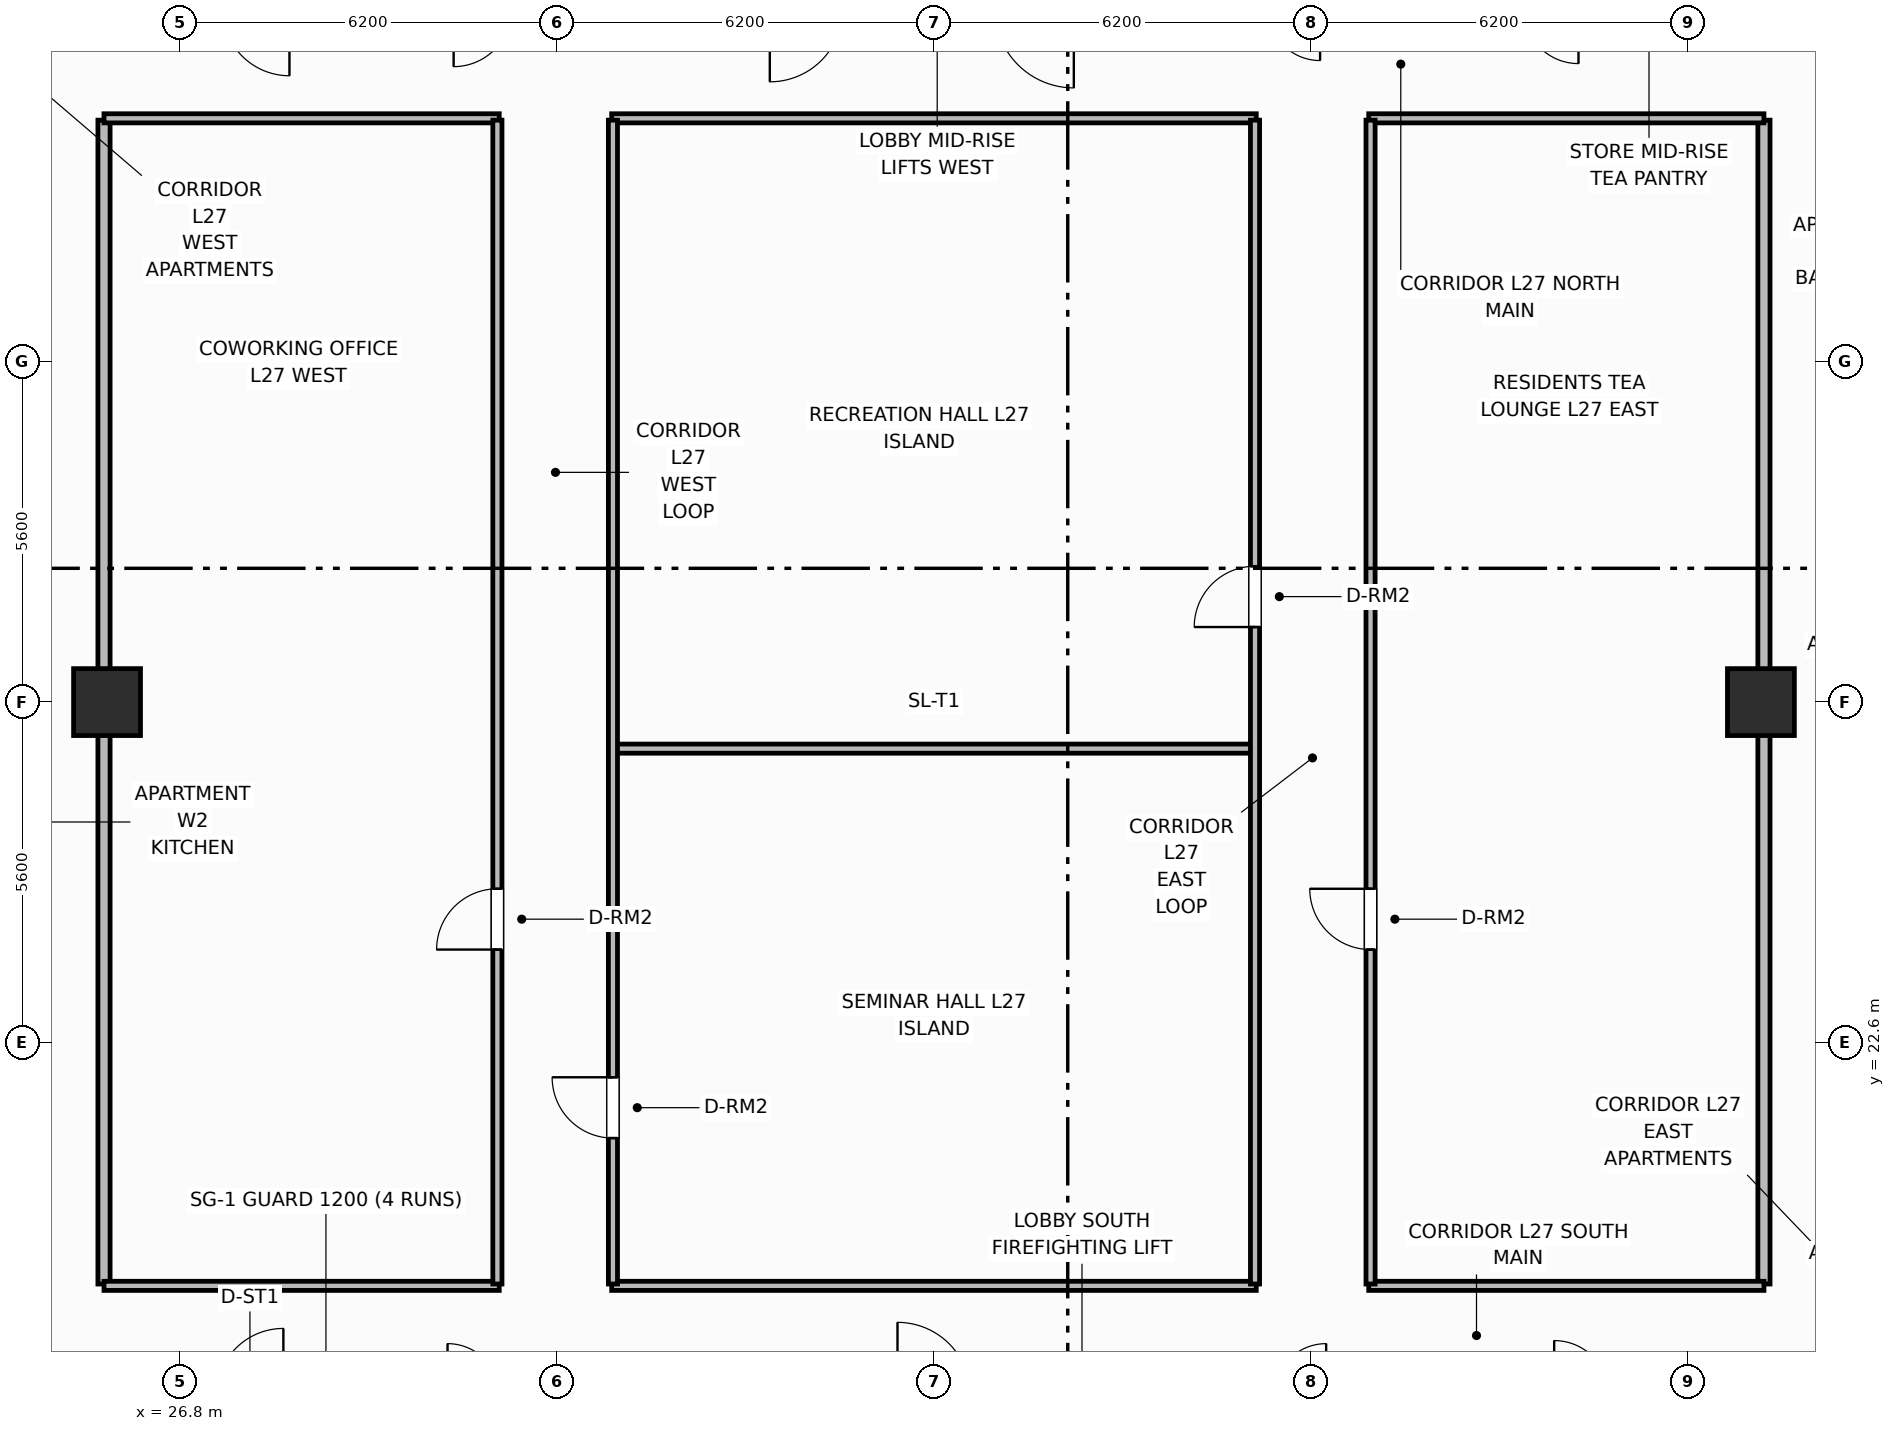
"""IFC4 building model, lengths in metres.
Left out: names, types, materials, properties, quantities, classifications, styles, units other than length and angle.
Written with IfcOpenShell. Run it as: python <this file> out.ifc"""

import sys

from ifc_helpers import new_model, si_unit, direction, frame, frame_2d, origin, origin_2d, place, context, subcontext, project, spatial, rectangle, extrude, element, fill, save


model = new_model("IFC4")
c1 = context("Model", 3, precision=1e-05, world=origin(), true_north=direction((0.0, 1.0)))
c2 = subcontext(c1, "Body", "Model", "MODEL_VIEW")
j1 = project(units=[si_unit("LENGTHUNIT", "METRE"), si_unit("PLANEANGLEUNIT", "RADIAN")], contexts=[c1])
p1 = place(None, origin())
s1 = spatial("IfcSite", under=j1, at=p1, CompositionType="ELEMENT")
p2 = place(p1, origin())
s2 = spatial("IfcBuilding", under=s1, at=p2, CompositionType="ELEMENT")
p3 = place(p2, frame((0.0, 0.0, 110.5)))
s3 = spatial("IfcBuildingStorey", under=s2, at=p3, CompositionType="ELEMENT", Elevation=110.5)
for number, where, z_axis, x_axis in (
    (1, (25.6, 28.2, 0.0), (0.0, 0.0, 1.0), (1.0, 0.0, 0.0)),
    (2, (52.8, 28.2, 0.0), (0.0, 0.0, 1.0), (1.0, 0.0, 0.0)),
):
    element("IfcColumn", number, at=place(p3, frame(where, z_axis=z_axis, x_axis=x_axis)), inside=s3, PredefinedType="COLUMN", context=c2, shape_type="SweptSolid", body=[
        extrude(rectangle(XDim=1.1, YDim=1.1, at=origin_2d()), origin(), (0.0, 0.0, 1.0), 3.7),
    ])
for number, where, z_axis, x_axis in (
    (3, (25.55, 18.63, 0.0), (0.0, 0.0, 1.0), (0.0, 1.0, 0.0)),
    (4, (52.85, 18.63, 0.0), (0.0, 0.0, 1.0), (0.0, 1.0, 0.0)),
):
    element("IfcWall", number, at=place(p3, frame(where, z_axis=z_axis, x_axis=x_axis)), inside=s3, PredefinedType="PARTITIONING", context=c2, shape_type="SweptSolid", body=[
        extrude(rectangle(XDim=19.14, YDim=0.2, at=frame_2d((9.57, 0.0))), origin(), (0.0, 0.0, 1.0), 2.53),
    ])
for number, where, z_axis, x_axis in (
    (5, (25.55, 18.6, 0.0), (0.0, 0.0, 1.0), (1.0, 0.0, 0.0)),
    (6, (25.55, 37.8, 0.0), (0.0, 0.0, 1.0), (1.0, 0.0, 0.0)),
):
    element("IfcWall", number, at=place(p3, frame(where, z_axis=z_axis, x_axis=x_axis)), inside=s3, PredefinedType="PARTITIONING", context=c2, shape_type="SweptSolid", body=[
        extrude(rectangle(XDim=6.5, YDim=0.15, at=frame_2d((3.25, 0.0))), origin(), (0.0, 0.0, 1.0), 2.53),
    ])
for number, where, z_axis, x_axis in (
    (7, (33.9, 18.6, 0.0), (0.0, 0.0, 1.0), (1.0, 0.0, 0.0)),
    (8, (33.9, 37.8, 0.0), (0.0, 0.0, 1.0), (1.0, 0.0, 0.0)),
):
    element("IfcWall", number, at=place(p3, frame(where, z_axis=z_axis, x_axis=x_axis)), inside=s3, PredefinedType="PARTITIONING", context=c2, shape_type="SweptSolid", body=[
        extrude(rectangle(XDim=10.6, YDim=0.15, at=frame_2d((5.3, 0.0))), origin(), (0.0, 0.0, 1.0), 2.53),
    ])
for number, where, z_axis, x_axis in (
    (9, (46.35, 18.6, 0.0), (0.0, 0.0, 1.0), (1.0, 0.0, 0.0)),
    (10, (46.35, 37.8, 0.0), (0.0, 0.0, 1.0), (1.0, 0.0, 0.0)),
):
    element("IfcWall", number, at=place(p3, frame(where, z_axis=z_axis, x_axis=x_axis)), inside=s3, PredefinedType="PARTITIONING", context=c2, shape_type="SweptSolid", body=[
        extrude(rectangle(XDim=6.5, YDim=0.15, at=frame_2d((3.25, 0.0))), origin(), (0.0, 0.0, 1.0), 2.53),
    ])
p4 = place(p3, frame((33.92, 27.434, 0.0), z_axis=(0.0, 0.0, 1.0), x_axis=(1.0, 0.0, 0.0)))
e11 = element("IfcWall", 11, at=p4, inside=s3, PredefinedType="PARTITIONING", context=c2, shape_type="SweptSolid", body=[
    extrude(rectangle(XDim=10.56, YDim=0.15, at=frame_2d((5.28, 0.0))), origin(), (0.0, 0.0, 1.0), 2.53),
])
p5 = place(p3, frame((32.02, 18.63, 0.0), z_axis=(0.0, 0.0, 1.0), x_axis=(0.0, 1.0, 0.0)))
e12 = element("IfcWall", 12, at=p5, inside=s3, PredefinedType="PARTITIONING", context=c2, shape_type="SweptSolid", body=[
    extrude(rectangle(XDim=19.14, YDim=0.15, at=frame_2d((9.57, 0.0))), origin(), (0.0, 0.0, 1.0), 2.53),
])
p6 = place(p5, frame((5.5, 0.0, 0.0)))
e13 = element("IfcOpeningElement", 13, at=p6, cuts=e12, PredefinedType="OPENING", context=c2, shape_type="SweptSolid", body=[
    extrude(rectangle(XDim=1.0, YDim=2.15, at=frame_2d((0.5, 1.075))), frame((0.0, 0.085, 0.0), z_axis=(0.0, -1.0, 0.0), x_axis=(1.0, 0.0, 0.0)), (0.0, 0.0, 1.0), 0.17),
])
p7 = place(p3, frame((33.92, 18.63, 0.0), z_axis=(0.0, 0.0, 1.0), x_axis=(0.0, 1.0, 0.0)))
e14 = element("IfcWall", 14, at=p7, inside=s3, PredefinedType="PARTITIONING", context=c2, shape_type="SweptSolid", body=[
    extrude(rectangle(XDim=19.14, YDim=0.15, at=frame_2d((9.57, 0.0))), origin(), (0.0, 0.0, 1.0), 2.53),
])
p8 = place(p7, frame((2.4, 0.0, 0.0)))
e15 = element("IfcOpeningElement", 15, at=p8, cuts=e14, PredefinedType="OPENING", context=c2, shape_type="SweptSolid", body=[
    extrude(rectangle(XDim=1.0, YDim=2.15, at=frame_2d((0.5, 1.075))), frame((0.0, 0.085, 0.0), z_axis=(0.0, -1.0, 0.0), x_axis=(1.0, 0.0, 0.0)), (0.0, 0.0, 1.0), 0.17),
])
p9 = place(p3, frame((44.48, 18.63, 0.0), z_axis=(0.0, 0.0, 1.0), x_axis=(0.0, 1.0, 0.0)))
e16 = element("IfcWall", 16, at=p9, inside=s3, PredefinedType="PARTITIONING", context=c2, shape_type="SweptSolid", body=[
    extrude(rectangle(XDim=19.14, YDim=0.15, at=frame_2d((9.57, 0.0))), origin(), (0.0, 0.0, 1.0), 2.53),
])
p10 = place(p9, frame((10.804, 0.0, 0.0)))
e17 = element("IfcOpeningElement", 17, at=p10, cuts=e16, PredefinedType="OPENING", context=c2, shape_type="SweptSolid", body=[
    extrude(rectangle(XDim=1.0, YDim=2.15, at=frame_2d((0.5, 1.075))), frame((0.0, 0.085, 0.0), z_axis=(0.0, -1.0, 0.0), x_axis=(1.0, 0.0, 0.0)), (0.0, 0.0, 1.0), 0.17),
])
p11 = place(p3, frame((46.38, 18.63, 0.0), z_axis=(0.0, 0.0, 1.0), x_axis=(0.0, 1.0, 0.0)))
e18 = element("IfcWall", 18, at=p11, inside=s3, PredefinedType="PARTITIONING", context=c2, shape_type="SweptSolid", body=[
    extrude(rectangle(XDim=19.14, YDim=0.15, at=frame_2d((9.57, 0.0))), origin(), (0.0, 0.0, 1.0), 2.53),
])
p12 = place(p11, frame((5.5, 0.0, 0.0)))
e19 = element("IfcOpeningElement", 19, at=p12, cuts=e18, PredefinedType="OPENING", context=c2, shape_type="SweptSolid", body=[
    extrude(rectangle(XDim=1.0, YDim=2.15, at=frame_2d((0.5, 1.075))), frame((0.0, 0.085, 0.0), z_axis=(0.0, -1.0, 0.0), x_axis=(1.0, 0.0, 0.0)), (0.0, 0.0, 1.0), 0.17),
])
p13 = place(p6, origin())
e20 = element("IfcDoor", 20, at=p13, inside=s3, OperationType="SINGLE_SWING_LEFT", PredefinedType="DOOR", context=c2, shape_type="SweptSolid", body=[
    extrude(rectangle(XDim=1.0, YDim=2.15, at=frame_2d((0.5, 1.075))), frame((0.0, 0.025, 0.0), z_axis=(0.0, -1.0, 0.0), x_axis=(1.0, 0.0, 0.0)), (0.0, 0.0, 1.0), 0.05),
])
fill(e13, e20)
p14 = place(p8, origin())
e21 = element("IfcDoor", 21, at=p14, inside=s3, OperationType="SINGLE_SWING_RIGHT", PredefinedType="DOOR", context=c2, shape_type="SweptSolid", body=[
    extrude(rectangle(XDim=1.0, YDim=2.15, at=frame_2d((0.5, 1.075))), frame((0.0, 0.025, 0.0), z_axis=(0.0, -1.0, 0.0), x_axis=(1.0, 0.0, 0.0)), (0.0, 0.0, 1.0), 0.05),
])
fill(e15, e21)
p15 = place(p10, origin())
e22 = element("IfcDoor", 22, at=p15, inside=s3, OperationType="SINGLE_SWING_LEFT", PredefinedType="DOOR", context=c2, shape_type="SweptSolid", body=[
    extrude(rectangle(XDim=1.0, YDim=2.15, at=frame_2d((0.5, 1.075))), frame((0.0, 0.025, 0.0), z_axis=(0.0, -1.0, 0.0), x_axis=(1.0, 0.0, 0.0)), (0.0, 0.0, 1.0), 0.05),
])
fill(e17, e22)
p16 = place(p12, origin())
e23 = element("IfcDoor", 23, at=p16, inside=s3, OperationType="SINGLE_SWING_RIGHT", PredefinedType="DOOR", context=c2, shape_type="SweptSolid", body=[
    extrude(rectangle(XDim=1.0, YDim=2.15, at=frame_2d((0.5, 1.075))), frame((0.0, 0.025, 0.0), z_axis=(0.0, -1.0, 0.0), x_axis=(1.0, 0.0, 0.0)), (0.0, 0.0, 1.0), 0.05),
])
fill(e19, e23)
save(model, sys.argv[1])
